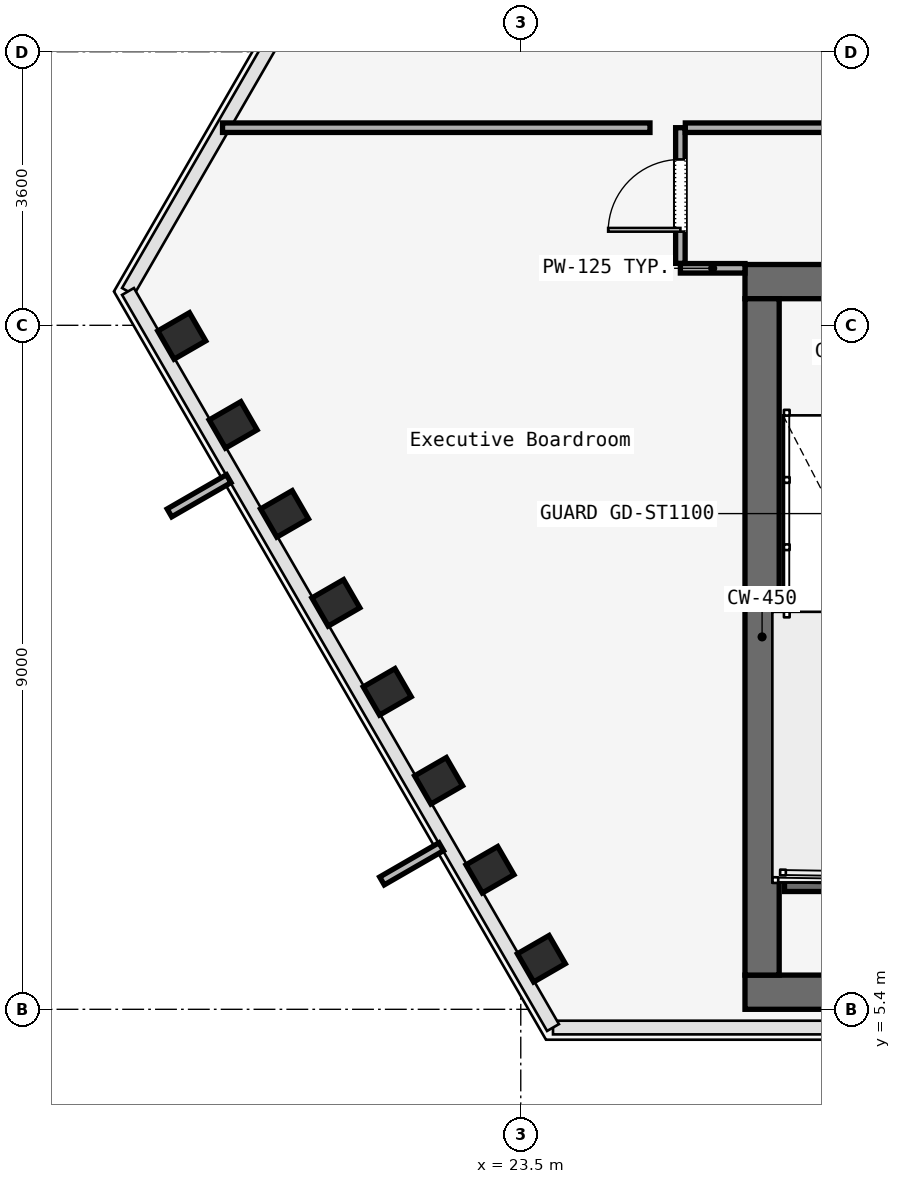
"""IFC4 building model, lengths in metres.
Left out: names, types, materials, properties, quantities, classifications, styles, units other than length and angle.
Written with IfcOpenShell. Run it as: python <this file> out.ifc"""

import sys

from ifc_helpers import new_model, si_unit, direction, frame, frame_2d, origin, origin_2d, place, context, subcontext, project, spatial, rectangle, i_section, extrude, element, fill, save


model = new_model("IFC4")
c1 = context("Model", 3, precision=1e-05, world=origin(), true_north=direction((0.0, 1.0)))
c2 = subcontext(c1, "Body", "Model", "MODEL_VIEW")
j1 = project(units=[si_unit("LENGTHUNIT", "METRE"), si_unit("PLANEANGLEUNIT", "RADIAN")], contexts=[c1])
p1 = place(None, origin())
s1 = spatial("IfcSite", under=j1, at=p1, CompositionType="ELEMENT")
p2 = place(p1, origin())
s2 = spatial("IfcBuilding", under=s1, at=p2, CompositionType="ELEMENT")
p3 = place(p2, frame((0.0, 0.0, 153.6)))
s3 = spatial("IfcBuildingStorey", under=s2, at=p3, CompositionType="ELEMENT", Elevation=153.6)
p4 = place(p3, frame((26.45, 14.975, 0.0), z_axis=(0.0, 0.0, 1.0), x_axis=(1.0, 0.0, 0.0)))
e1 = element("IfcWall", 1, at=p4, inside=s3, PredefinedType="SOLIDWALL", context=c2, shape_type="SweptSolid", body=[
    extrude(rectangle(XDim=31.1, YDim=0.45, at=frame_2d((15.55, 0.0))), origin(), (0.0, 0.0, 1.0), 3.58),
])
p5 = place(p4, frame((1.65, 0.0, 0.0)))
e2 = element("IfcOpeningElement", 2, at=p5, cuts=e1, PredefinedType="OPENING", context=c2, shape_type="SweptSolid", body=[
    extrude(rectangle(XDim=1.1, YDim=2.2, at=frame_2d((0.55, 1.1))), frame((0.0, 0.225, 0.0), z_axis=(0.0, -1.0, 0.0), x_axis=(1.0, 0.0, 0.0)), (0.0, 0.0, 1.0), 0.45),
])
p6 = place(p4, frame((13.65, 0.0, 0.0)))
e3 = element("IfcOpeningElement", 3, at=p6, cuts=e1, PredefinedType="OPENING", context=c2, shape_type="SweptSolid", body=[
    extrude(rectangle(XDim=1.1, YDim=2.2, at=frame_2d((0.55, 1.1))), frame((0.0, 0.225, 0.0), z_axis=(0.0, -1.0, 0.0), x_axis=(1.0, 0.0, 0.0)), (0.0, 0.0, 1.0), 0.45),
])
p7 = place(p4, frame((25.55, 0.0, 0.0)))
e4 = element("IfcOpeningElement", 4, at=p7, cuts=e1, PredefinedType="OPENING", context=c2, shape_type="SweptSolid", body=[
    extrude(rectangle(XDim=1.1, YDim=2.2, at=frame_2d((0.55, 1.1))), frame((0.0, 0.225, 0.0), z_axis=(0.0, -1.0, 0.0), x_axis=(1.0, 0.0, 0.0)), (0.0, 0.0, 1.0), 0.45),
])
p8 = place(p4, frame((10.7, 0.0, 0.0)))
e5 = element("IfcOpeningElement", 5, at=p8, cuts=e1, PredefinedType="OPENING", context=c2, shape_type="SweptSolid", body=[
    extrude(rectangle(XDim=1.4, YDim=2.2, at=frame_2d((0.7, 1.1))), frame((0.0, 0.225, 0.0), z_axis=(0.0, -1.0, 0.0), x_axis=(1.0, 0.0, 0.0)), (0.0, 0.0, 1.0), 0.45),
])
p9 = place(p4, frame((19.35, 0.0, 0.0)))
e6 = element("IfcOpeningElement", 6, at=p9, cuts=e1, PredefinedType="OPENING", context=c2, shape_type="SweptSolid", body=[
    extrude(rectangle(XDim=1.1, YDim=2.2, at=frame_2d((0.55, 1.1))), frame((0.0, 0.225, 0.0), z_axis=(0.0, -1.0, 0.0), x_axis=(1.0, 0.0, 0.0)), (0.0, 0.0, 1.0), 0.45),
])
p10 = place(p4, frame((21.4, 0.0, 0.0)))
e7 = element("IfcOpeningElement", 7, at=p10, cuts=e1, PredefinedType="OPENING", context=c2, shape_type="SweptSolid", body=[
    extrude(rectangle(XDim=0.9, YDim=2.1, at=frame_2d((0.45, 1.05))), frame((0.0, 0.225, 0.0), z_axis=(0.0, -1.0, 0.0), x_axis=(1.0, 0.0, 0.0)), (0.0, 0.0, 1.0), 0.45),
])
p11 = place(p4, frame((23.35, 0.0, 0.0)))
e8 = element("IfcOpeningElement", 8, at=p11, cuts=e1, PredefinedType="OPENING", context=c2, shape_type="SweptSolid", body=[
    extrude(rectangle(XDim=1.3, YDim=2.3, at=frame_2d((0.65, 1.15))), frame((0.0, 0.225, 0.0), z_axis=(0.0, -1.0, 0.0), x_axis=(1.0, 0.0, 0.0)), (0.0, 0.0, 1.0), 0.45),
])
p12 = place(p3, frame((26.45, 5.625, 0.0), z_axis=(0.0, 0.0, 1.0), x_axis=(1.0, 0.0, 0.0)))
e9 = element("IfcWall", 9, at=p12, inside=s3, PredefinedType="SOLIDWALL", context=c2, shape_type="SweptSolid", body=[
    extrude(rectangle(XDim=31.1, YDim=0.45, at=frame_2d((15.55, 0.0))), origin(), (0.0, 0.0, 1.0), 3.58),
])
p13 = place(p3, frame((26.675, 5.85, 0.0), z_axis=(0.0, 0.0, 1.0), x_axis=(0.0, 1.0, 0.0)))
e10 = element("IfcWall", 10, at=p13, inside=s3, PredefinedType="SOLIDWALL", context=c2, shape_type="SweptSolid", body=[
    extrude(rectangle(XDim=8.9, YDim=0.45, at=frame_2d((4.45, 0.0))), origin(), (0.0, 0.0, 1.0), 3.58),
])
for number, where, z_axis, x_axis in (
    (11, (19.04, 14.26, 0.0), (0.0, 0.0, 1.0), (-0.5, 0.866, 0.0)),
    (12, (19.716, 13.089, 0.0), (0.0, 0.0, 1.0), (-0.5, 0.866, 0.0)),
    (13, (20.392, 11.919, 0.0), (0.0, 0.0, 1.0), (-0.5, 0.866, 0.0)),
    (14, (21.067, 10.748, 0.0), (0.0, 0.0, 1.0), (-0.5, 0.866, 0.0)),
    (15, (21.743, 9.577, 0.0), (0.0, 0.0, 1.0), (-0.5, 0.866, 0.0)),
    (16, (22.419, 8.407, 0.0), (0.0, 0.0, 1.0), (-0.5, 0.866, 0.0)),
    (17, (23.095, 7.236, 0.0), (0.0, 0.0, 1.0), (-0.5, 0.866, 0.0)),
    (18, (23.771, 6.065, 0.0), (0.0, 0.0, 1.0), (-0.5, 0.866, 0.0)),
):
    element("IfcColumn", number, at=place(p3, frame(where, z_axis=z_axis, x_axis=x_axis)), inside=s3, PredefinedType="COLUMN", context=c2, shape_type="SweptSolid", body=[
        extrude(i_section(OverallWidth=0.428, OverallDepth=0.481, WebThickness=0.051, FlangeThickness=0.065, FilletRadius=0.015, at=origin_2d()), origin(), (0.0, 0.0, 1.0), 3.58),
    ])
p14 = place(p3, frame((26.97, 7.05, 0.0), z_axis=(0.0, 0.0, 1.0), x_axis=(1.0, 0.0, 0.0)))
e19 = element("IfcWall", 19, at=p14, inside=s3, PredefinedType="SOLIDWALL", context=c2, shape_type="SweptSolid", body=[
    extrude(rectangle(XDim=3.115, YDim=0.2, at=frame_2d((1.558, 0.0))), origin(), (0.0, 0.0, 1.0), 3.8),
])
p15 = place(p3, frame((26.45, 15.15, 0.0), z_axis=(0.0, 0.0, 1.0), x_axis=(-1.0, 0.0, 0.0)))
e20 = element("IfcWall", 20, at=p15, inside=s3, PredefinedType="PARTITIONING", context=c2, shape_type="SweptSolid", body=[
    extrude(rectangle(XDim=0.85, YDim=0.125, at=frame_2d((0.425, 0.0))), origin(), (0.0, 0.0, 1.0), 3.01),
])
p16 = place(p3, frame((25.6, 15.215, 0.0), z_axis=(0.0, 0.0, 1.0), x_axis=(0.0, 1.0, 0.0)))
e21 = element("IfcWall", 21, at=p16, inside=s3, PredefinedType="PARTITIONING", context=c2, shape_type="SweptSolid", body=[
    extrude(rectangle(XDim=1.785, YDim=0.125, at=frame_2d((0.893, 0.0))), origin(), (0.0, 0.0, 1.0), 3.01),
])
p17 = place(p16, frame((0.417, 0.0, 0.0)))
e22 = element("IfcOpeningElement", 22, at=p17, cuts=e21, PredefinedType="OPENING", context=c2, shape_type="SweptSolid", body=[
    extrude(rectangle(XDim=0.95, YDim=2.2, at=frame_2d((0.475, 1.1))), frame((0.0, 0.062, 0.0), z_axis=(0.0, -1.0, 0.0), x_axis=(1.0, 0.0, 0.0)), (0.0, 0.0, 1.0), 0.125),
])
p18 = place(p3, frame((25.665, 17.0, 0.0), z_axis=(0.0, 0.0, 1.0), x_axis=(1.0, 0.0, 0.0)))
e23 = element("IfcWall", 23, at=p18, inside=s3, PredefinedType="PARTITIONING", context=c2, shape_type="SweptSolid", body=[
    extrude(rectangle(XDim=5.735, YDim=0.125, at=frame_2d((2.867, 0.0))), origin(), (0.0, 0.0, 1.0), 3.01),
])
p19 = place(p18, frame((2.167, 0.0, 0.0)))
e24 = element("IfcOpeningElement", 24, at=p19, cuts=e23, PredefinedType="OPENING", context=c2, shape_type="SweptSolid", body=[
    extrude(rectangle(XDim=1.4, YDim=2.2, at=frame_2d((0.7, 1.1))), frame((0.0, 0.062, 0.0), z_axis=(0.0, -1.0, 0.0), x_axis=(1.0, 0.0, 0.0)), (0.0, 0.0, 1.0), 0.125),
])
p20 = place(p3, frame((19.576, 17.0, 0.0), z_axis=(0.0, 0.0, 1.0), x_axis=(1.0, 0.0, 0.0)))
e25 = element("IfcWall", 25, at=p20, inside=s3, PredefinedType="PARTITIONING", context=c2, shape_type="SweptSolid", body=[
    extrude(rectangle(XDim=5.624, YDim=0.125, at=frame_2d((2.812, 0.0))), origin(), (0.0, 0.0, 1.0), 3.01),
])
p21 = place(p17, origin())
e26 = element("IfcDoor", 26, at=p21, inside=s3, OperationType="SINGLE_SWING_LEFT", PredefinedType="DOOR", context=c2, shape_type="SweptSolid", body=[
    extrude(rectangle(XDim=0.95, YDim=2.2, at=frame_2d((0.475, 1.1))), frame((0.0, 0.025, 0.0), z_axis=(0.0, -1.0, 0.0), x_axis=(1.0, 0.0, 0.0)), (0.0, 0.0, 1.0), 0.05),
])
fill(e22, e26)
save(model, sys.argv[1])
